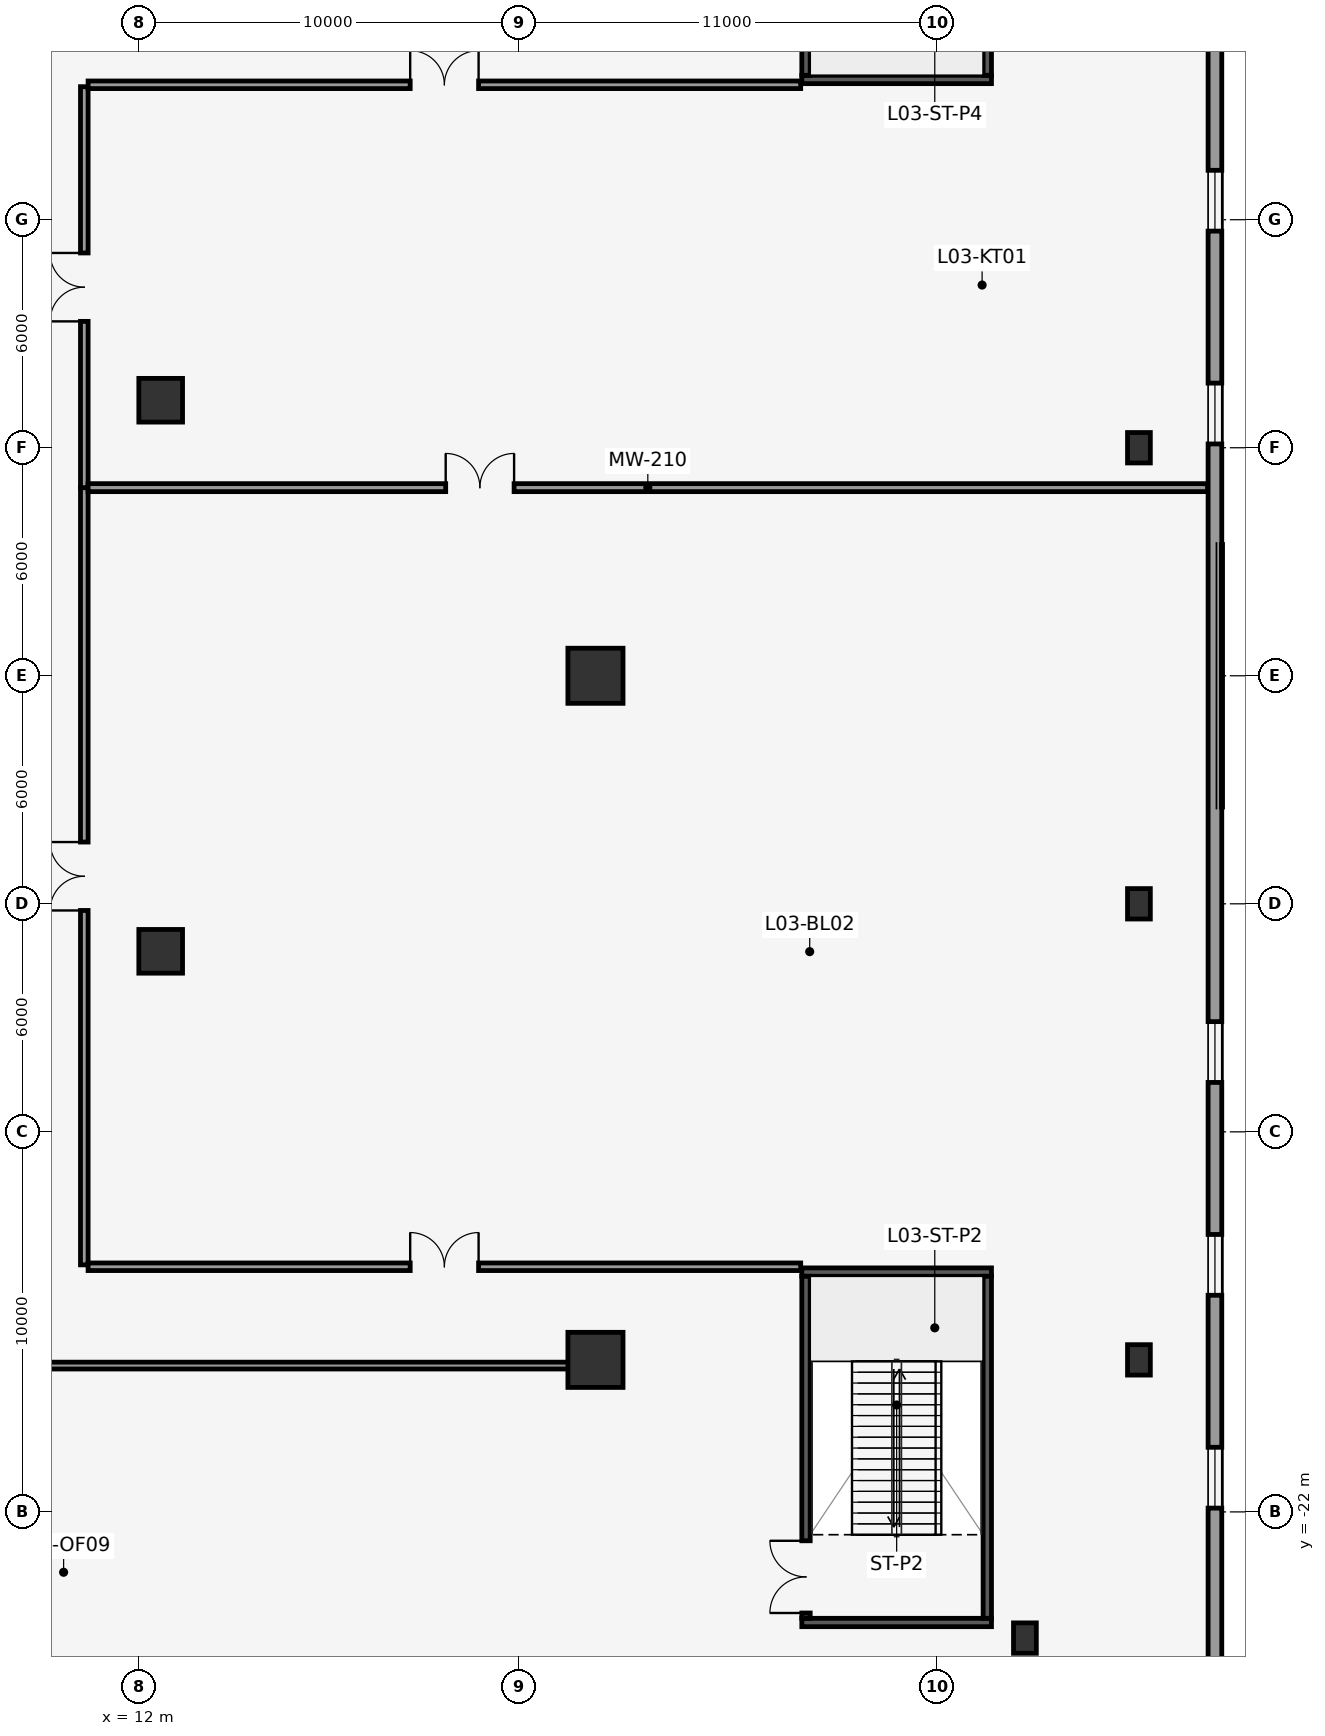
"""IFC4 building model, lengths in metres.
Left out: names, types, materials, properties, quantities, classifications, styles, units other than length and angle.
Written with IfcOpenShell. Run it as: python <this file> out.ifc"""

import sys

from ifc_helpers import new_model, si_unit, direction, frame, frame_2d, origin, origin_2d, place, context, subcontext, project, spatial, rectangle, hollow_rectangle, extrude, element, fill, save


model = new_model("IFC4")
c1 = context("Model", 3, precision=1e-05, world=origin(), true_north=direction((0.0, 1.0)))
c2 = subcontext(c1, "Body", "Model", "MODEL_VIEW")
j1 = project(units=[si_unit("LENGTHUNIT", "METRE"), si_unit("PLANEANGLEUNIT", "RADIAN")], contexts=[c1])
p1 = place(None, origin())
s1 = spatial("IfcSite", under=j1, at=p1, CompositionType="ELEMENT")
p2 = place(p1, origin())
s2 = spatial("IfcBuilding", under=s1, at=p2, CompositionType="ELEMENT")
p3 = place(p2, frame((0.0, 0.0, 17.5)))
s3 = spatial("IfcBuildingStorey", under=s2, at=p3, CompositionType="ELEMENT", Elevation=17.5)
for number, where, z_axis, x_axis in (
    (1, (12.56, -7.25, 0.0), (0.0, 0.0, 1.0), (1.0, 0.0, 0.0)),
    (2, (12.56, 7.25, 0.0), (0.0, 0.0, 1.0), (1.0, 0.0, 0.0)),
):
    element("IfcColumn", number, at=place(p3, frame(where, z_axis=z_axis, x_axis=x_axis)), inside=s3, PredefinedType="COLUMN", context=c2, shape_type="SweptSolid", body=[
        extrude(rectangle(XDim=1.15, YDim=1.15, at=origin_2d()), origin(), (0.0, 0.0, 1.0), 6.0),
    ])
for number, where, z_axis, x_axis in (
    (3, (24.0, -18.0, 0.0), (0.0, 0.0, 1.0), (1.0, 0.0, 0.0)),
    (4, (24.0, 0.0, 0.0), (0.0, 0.0, 1.0), (1.0, 0.0, 0.0)),
):
    element("IfcColumn", number, at=place(p3, frame(where, z_axis=z_axis, x_axis=x_axis)), inside=s3, PredefinedType="COLUMN", context=c2, shape_type="SweptSolid", body=[
        extrude(rectangle(XDim=1.45, YDim=1.45, at=origin_2d()), origin(), (0.0, 0.0, 1.0), 6.0),
    ])
for number, where, z_axis, x_axis in (
    (5, (38.3, -18.0, 0.0), (0.0, 0.0, 1.0), (1.0, 0.0, 0.0)),
    (6, (38.3, -6.0, 0.0), (0.0, 0.0, 1.0), (1.0, 0.0, 0.0)),
    (7, (38.3, 6.0, 0.0), (0.0, 0.0, 1.0), (1.0, 0.0, 0.0)),
    (8, (35.3, -25.32, 0.0), (0.0, 0.0, 1.0), (1.0, 0.0, 0.0)),
):
    element("IfcColumn", number, at=place(p3, frame(where, z_axis=z_axis, x_axis=x_axis)), inside=s3, PredefinedType="COLUMN", context=c2, shape_type="SweptSolid", body=[
        extrude(hollow_rectangle(XDim=0.6, YDim=0.8, WallThickness=0.05, at=origin_2d()), origin(), (0.0, 0.0, 1.0), 6.0),
    ])
p4 = place(p3, frame((40.3, 29.3, 0.0), z_axis=(0.0, 0.0, 1.0), x_axis=(0.0, -1.0, 0.0)))
e9 = element("IfcWall", 9, at=p4, inside=s3, PredefinedType="STANDARD", context=c2, shape_type="SweptSolid", body=[
    extrude(rectangle(XDim=58.6, YDim=0.36, at=frame_2d((29.3, 0.0))), origin(), (0.0, 0.0, 1.0), 5.7),
])
p5 = place(p4, frame((4.8, 0.0, 0.9)))
e10 = element("IfcOpeningElement", 10, at=p5, cuts=e9, PredefinedType="OPENING", context=c2, shape_type="SweptSolid", body=[
    extrude(rectangle(XDim=1.6, YDim=2.6, at=frame_2d((0.8, 1.3))), frame((0.0, 0.19, 0.0), z_axis=(0.0, -1.0, 0.0), x_axis=(1.0, 0.0, 0.0)), (0.0, 0.0, 1.0), 0.38),
])
p6 = place(p4, frame((10.4, 0.0, 0.9)))
e11 = element("IfcOpeningElement", 11, at=p6, cuts=e9, PredefinedType="OPENING", context=c2, shape_type="SweptSolid", body=[
    extrude(rectangle(XDim=1.6, YDim=2.6, at=frame_2d((0.8, 1.3))), frame((0.0, 0.19, 0.0), z_axis=(0.0, -1.0, 0.0), x_axis=(1.0, 0.0, 0.0)), (0.0, 0.0, 1.0), 0.38),
])
p7 = place(p4, frame((16.0, 0.0, 0.9)))
e12 = element("IfcOpeningElement", 12, at=p7, cuts=e9, PredefinedType="OPENING", context=c2, shape_type="SweptSolid", body=[
    extrude(rectangle(XDim=1.6, YDim=2.6, at=frame_2d((0.8, 1.3))), frame((0.0, 0.19, 0.0), z_axis=(0.0, -1.0, 0.0), x_axis=(1.0, 0.0, 0.0)), (0.0, 0.0, 1.0), 0.38),
])
p8 = place(p4, frame((21.6, 0.0, 0.9)))
e13 = element("IfcOpeningElement", 13, at=p8, cuts=e9, PredefinedType="OPENING", context=c2, shape_type="SweptSolid", body=[
    extrude(rectangle(XDim=1.6, YDim=2.6, at=frame_2d((0.8, 1.3))), frame((0.0, 0.19, 0.0), z_axis=(0.0, -1.0, 0.0), x_axis=(1.0, 0.0, 0.0)), (0.0, 0.0, 1.0), 0.38),
])
p9 = place(p4, frame((38.4, 0.0, 0.9)))
e14 = element("IfcOpeningElement", 14, at=p9, cuts=e9, PredefinedType="OPENING", context=c2, shape_type="SweptSolid", body=[
    extrude(rectangle(XDim=1.6, YDim=2.6, at=frame_2d((0.8, 1.3))), frame((0.0, 0.19, 0.0), z_axis=(0.0, -1.0, 0.0), x_axis=(1.0, 0.0, 0.0)), (0.0, 0.0, 1.0), 0.38),
])
p10 = place(p4, frame((44.0, 0.0, 0.9)))
e15 = element("IfcOpeningElement", 15, at=p10, cuts=e9, PredefinedType="OPENING", context=c2, shape_type="SweptSolid", body=[
    extrude(rectangle(XDim=1.6, YDim=2.6, at=frame_2d((0.8, 1.3))), frame((0.0, 0.19, 0.0), z_axis=(0.0, -1.0, 0.0), x_axis=(1.0, 0.0, 0.0)), (0.0, 0.0, 1.0), 0.38),
])
p11 = place(p4, frame((49.6, 0.0, 0.9)))
e16 = element("IfcOpeningElement", 16, at=p11, cuts=e9, PredefinedType="OPENING", context=c2, shape_type="SweptSolid", body=[
    extrude(rectangle(XDim=1.6, YDim=2.6, at=frame_2d((0.8, 1.3))), frame((0.0, 0.19, 0.0), z_axis=(0.0, -1.0, 0.0), x_axis=(1.0, 0.0, 0.0)), (0.0, 0.0, 1.0), 0.38),
])
for number, where, z_axis, x_axis in (
    (17, (29.43, -24.91, 0.0), (0.0, 0.0, 1.0), (1.0, 0.0, 0.0)),
    (18, (29.43, -15.69, 0.0), (0.0, 0.0, 1.0), (1.0, 0.0, 0.0)),
):
    element("IfcWall", number, at=place(p3, frame(where, z_axis=z_axis, x_axis=x_axis)), inside=s3, PredefinedType="SHEAR", context=c2, shape_type="SweptSolid", body=[
        extrude(rectangle(XDim=4.99, YDim=0.22, at=frame_2d((2.495, 0.0))), origin(), (0.0, 0.0, 1.0), 5.7),
    ])
p12 = place(p3, frame((29.54, -24.8, 0.0), z_axis=(0.0, 0.0, 1.0), x_axis=(0.0, 1.0, 0.0)))
e19 = element("IfcWall", 19, at=p12, inside=s3, PredefinedType="SHEAR", context=c2, shape_type="SweptSolid", body=[
    extrude(rectangle(XDim=9.0, YDim=0.22, at=frame_2d((4.5, 0.0))), origin(), (0.0, 0.0, 1.0), 5.7),
])
p13 = place(p12, frame((0.14, 0.0, 0.0)))
e20 = element("IfcOpeningElement", 20, at=p13, cuts=e19, PredefinedType="OPENING", context=c2, shape_type="SweptSolid", body=[
    extrude(rectangle(XDim=1.9, YDim=2.2, at=frame_2d((0.95, 1.1))), frame((0.0, 0.12, 0.0), z_axis=(0.0, -1.0, 0.0), x_axis=(1.0, 0.0, 0.0)), (0.0, 0.0, 1.0), 0.24),
])
p14 = place(p3, frame((34.31, -24.8, 0.0), z_axis=(0.0, 0.0, 1.0), x_axis=(0.0, 1.0, 0.0)))
e21 = element("IfcWall", 21, at=p14, inside=s3, PredefinedType="SHEAR", context=c2, shape_type="SweptSolid", body=[
    extrude(rectangle(XDim=9.0, YDim=0.22, at=frame_2d((4.5, 0.0))), origin(), (0.0, 0.0, 1.0), 5.7),
])
p15 = place(p3, frame((29.43, 15.69, 0.0), z_axis=(0.0, 0.0, 1.0), x_axis=(1.0, 0.0, 0.0)))
e22 = element("IfcWall", 22, at=p15, inside=s3, PredefinedType="SHEAR", context=c2, shape_type="SweptSolid", body=[
    extrude(rectangle(XDim=4.99, YDim=0.22, at=frame_2d((2.495, 0.0))), origin(), (0.0, 0.0, 1.0), 5.7),
])
p16 = place(p3, frame((29.54, 15.8, 0.0), z_axis=(0.0, 0.0, 1.0), x_axis=(0.0, 1.0, 0.0)))
e23 = element("IfcWall", 23, at=p16, inside=s3, PredefinedType="SHEAR", context=c2, shape_type="SweptSolid", body=[
    extrude(rectangle(XDim=9.0, YDim=0.22, at=frame_2d((4.5, 0.0))), origin(), (0.0, 0.0, 1.0), 5.7),
])
p17 = place(p16, frame((6.96, 0.0, 0.0)))
e24 = element("IfcOpeningElement", 24, at=p17, cuts=e23, PredefinedType="OPENING", context=c2, shape_type="SweptSolid", body=[
    extrude(rectangle(XDim=1.9, YDim=2.2, at=frame_2d((0.95, 1.1))), frame((0.0, 0.12, 0.0), z_axis=(0.0, -1.0, 0.0), x_axis=(1.0, 0.0, 0.0)), (0.0, 0.0, 1.0), 0.24),
])
p18 = place(p3, frame((34.31, 15.8, 0.0), z_axis=(0.0, 0.0, 1.0), x_axis=(0.0, 1.0, 0.0)))
e25 = element("IfcWall", 25, at=p18, inside=s3, PredefinedType="SHEAR", context=c2, shape_type="SweptSolid", body=[
    extrude(rectangle(XDim=9.0, YDim=0.22, at=frame_2d((4.5, 0.0))), origin(), (0.0, 0.0, 1.0), 5.7),
])
p19 = place(p3, frame((10.55, -15.5, 0.0), z_axis=(0.0, 0.0, 1.0), x_axis=(0.0, 1.0, 0.0)))
e26 = element("IfcWall", 26, at=p19, inside=s3, PredefinedType="PARTITIONING", context=c2, shape_type="SweptSolid", body=[
    extrude(rectangle(XDim=20.45, YDim=0.2, at=frame_2d((10.225, 0.0))), origin(), (0.0, 0.0, 1.0), 5.7),
])
p20 = place(p19, frame((9.325, 0.0, 0.0)))
e27 = element("IfcOpeningElement", 27, at=p20, cuts=e26, PredefinedType="OPENING", context=c2, shape_type="SweptSolid", body=[
    extrude(rectangle(XDim=1.8, YDim=2.2, at=frame_2d((0.9, 1.1))), frame((0.0, 0.11, 0.0), z_axis=(0.0, -1.0, 0.0), x_axis=(1.0, 0.0, 0.0)), (0.0, 0.0, 1.0), 0.22),
])
p21 = place(p3, frame((10.55, 4.95, 0.0), z_axis=(0.0, 0.0, 1.0), x_axis=(0.0, 1.0, 0.0)))
e28 = element("IfcWall", 28, at=p21, inside=s3, PredefinedType="PARTITIONING", context=c2, shape_type="SweptSolid", body=[
    extrude(rectangle(XDim=10.55, YDim=0.2, at=frame_2d((5.275, 0.0))), origin(), (0.0, 0.0, 1.0), 5.7),
])
p22 = place(p21, frame((4.375, 0.0, 0.0)))
e29 = element("IfcOpeningElement", 29, at=p22, cuts=e28, PredefinedType="OPENING", context=c2, shape_type="SweptSolid", body=[
    extrude(rectangle(XDim=1.8, YDim=2.2, at=frame_2d((0.9, 1.1))), frame((0.0, 0.11, 0.0), z_axis=(0.0, -1.0, 0.0), x_axis=(1.0, 0.0, 0.0)), (0.0, 0.0, 1.0), 0.22),
])
p23 = place(p3, frame((10.65, 4.95, 0.0), z_axis=(0.0, 0.0, 1.0), x_axis=(1.0, 0.0, 0.0)))
e30 = element("IfcWall", 30, at=p23, inside=s3, PredefinedType="MOVABLE", context=c2, shape_type="SweptSolid", body=[
    extrude(rectangle(XDim=29.455, YDim=0.21, at=frame_2d((14.728, 0.0))), origin(), (0.0, 0.0, 1.0), 4.18),
])
p24 = place(p23, frame((9.409, 0.0, 0.0)))
e31 = element("IfcOpeningElement", 31, at=p24, cuts=e30, PredefinedType="OPENING", context=c2, shape_type="SweptSolid", body=[
    extrude(rectangle(XDim=1.8, YDim=2.2, at=frame_2d((0.9, 1.1))), frame((0.0, 0.115, 0.0), z_axis=(0.0, -1.0, 0.0), x_axis=(1.0, 0.0, 0.0)), (0.0, 0.0, 1.0), 0.23),
])
p25 = place(p3, frame((10.65, 15.55, 0.0), z_axis=(0.0, 0.0, 1.0), x_axis=(1.0, 0.0, 0.0)))
e32 = element("IfcWall", 32, at=p25, inside=s3, PredefinedType="PARTITIONING", context=c2, shape_type="SweptSolid", body=[
    extrude(rectangle(XDim=18.75, YDim=0.2, at=frame_2d((9.375, 0.0))), origin(), (0.0, 0.0, 1.0), 5.7),
])
p26 = place(p25, frame((8.475, 0.0, 0.0)))
e33 = element("IfcOpeningElement", 33, at=p26, cuts=e32, PredefinedType="OPENING", context=c2, shape_type="SweptSolid", body=[
    extrude(rectangle(XDim=1.8, YDim=2.2, at=frame_2d((0.9, 1.1))), frame((0.0, 0.11, 0.0), z_axis=(0.0, -1.0, 0.0), x_axis=(1.0, 0.0, 0.0)), (0.0, 0.0, 1.0), 0.22),
])
p27 = place(p3, frame((10.65, -15.55, 0.0), z_axis=(0.0, 0.0, 1.0), x_axis=(1.0, 0.0, 0.0)))
e34 = element("IfcWall", 34, at=p27, inside=s3, PredefinedType="PARTITIONING", context=c2, shape_type="SweptSolid", body=[
    extrude(rectangle(XDim=18.75, YDim=0.2, at=frame_2d((9.375, 0.0))), origin(), (0.0, 0.0, 1.0), 5.7),
])
p28 = place(p27, frame((8.475, 0.0, 0.0)))
e35 = element("IfcOpeningElement", 35, at=p28, cuts=e34, PredefinedType="OPENING", context=c2, shape_type="SweptSolid", body=[
    extrude(rectangle(XDim=1.8, YDim=2.2, at=frame_2d((0.9, 1.1))), frame((0.0, 0.11, 0.0), z_axis=(0.0, -1.0, 0.0), x_axis=(1.0, 0.0, 0.0)), (0.0, 0.0, 1.0), 0.22),
])
p29 = place(p3, frame((-23.6, -18.15, 0.0), z_axis=(0.0, 0.0, 1.0), x_axis=(1.0, 0.0, 0.0)))
e36 = element("IfcWall", 36, at=p29, inside=s3, PredefinedType="PARTITIONING", context=c2, shape_type="SweptSolid", body=[
    extrude(rectangle(XDim=47.2, YDim=0.18, at=frame_2d((23.6, 0.0))), origin(), (0.0, 0.0, 1.0), 3.88),
])
p30 = place(p29, frame((13.26, 0.0, 0.0)))
e37 = element("IfcOpeningElement", 37, at=p30, cuts=e36, PredefinedType="OPENING", context=c2, shape_type="SweptSolid", body=[
    extrude(rectangle(XDim=1.8, YDim=2.2, at=frame_2d((0.9, 1.1))), frame((0.0, 0.1, 0.0), z_axis=(0.0, -1.0, 0.0), x_axis=(1.0, 0.0, 0.0)), (0.0, 0.0, 1.0), 0.2),
])
p31 = place(p7, origin())
e38 = element("IfcWindow", 38, at=p31, inside=s3, PartitioningType="DOUBLE_PANEL_VERTICAL", PredefinedType="WINDOW", context=c2, shape_type="SweptSolid", body=[
    extrude(rectangle(XDim=1.6, YDim=2.6, at=frame_2d((0.8, 1.3))), frame((0.0, 0.03, 0.0), z_axis=(0.0, -1.0, 0.0), x_axis=(1.0, 0.0, 0.0)), (0.0, 0.0, 1.0), 0.06),
])
fill(e12, e38)
p32 = place(p8, origin())
e39 = element("IfcWindow", 39, at=p32, inside=s3, PartitioningType="DOUBLE_PANEL_VERTICAL", PredefinedType="WINDOW", context=c2, shape_type="SweptSolid", body=[
    extrude(rectangle(XDim=1.6, YDim=2.6, at=frame_2d((0.8, 1.3))), frame((0.0, 0.03, 0.0), z_axis=(0.0, -1.0, 0.0), x_axis=(1.0, 0.0, 0.0)), (0.0, 0.0, 1.0), 0.06),
])
fill(e13, e39)
p33 = place(p9, origin())
e40 = element("IfcWindow", 40, at=p33, inside=s3, PartitioningType="DOUBLE_PANEL_VERTICAL", PredefinedType="WINDOW", context=c2, shape_type="SweptSolid", body=[
    extrude(rectangle(XDim=1.6, YDim=2.6, at=frame_2d((0.8, 1.3))), frame((0.0, 0.03, 0.0), z_axis=(0.0, -1.0, 0.0), x_axis=(1.0, 0.0, 0.0)), (0.0, 0.0, 1.0), 0.06),
])
fill(e14, e40)
p34 = place(p10, origin())
e41 = element("IfcWindow", 41, at=p34, inside=s3, PartitioningType="DOUBLE_PANEL_VERTICAL", PredefinedType="WINDOW", context=c2, shape_type="SweptSolid", body=[
    extrude(rectangle(XDim=1.6, YDim=2.6, at=frame_2d((0.8, 1.3))), frame((0.0, 0.03, 0.0), z_axis=(0.0, -1.0, 0.0), x_axis=(1.0, 0.0, 0.0)), (0.0, 0.0, 1.0), 0.06),
])
fill(e15, e41)
p35 = place(p11, origin())
e42 = element("IfcWindow", 42, at=p35, inside=s3, PartitioningType="DOUBLE_PANEL_VERTICAL", PredefinedType="WINDOW", context=c2, shape_type="SweptSolid", body=[
    extrude(rectangle(XDim=1.6, YDim=2.6, at=frame_2d((0.8, 1.3))), frame((0.0, 0.03, 0.0), z_axis=(0.0, -1.0, 0.0), x_axis=(1.0, 0.0, 0.0)), (0.0, 0.0, 1.0), 0.06),
])
fill(e16, e42)
p36 = place(p13, origin())
e43 = element("IfcDoor", 43, at=p36, inside=s3, OperationType="DOUBLE_DOOR_SINGLE_SWING", PredefinedType="DOOR", context=c2, shape_type="SweptSolid", body=[
    extrude(rectangle(XDim=1.9, YDim=2.2, at=frame_2d((0.95, 1.1))), frame((0.0, 0.025, 0.0), z_axis=(0.0, -1.0, 0.0), x_axis=(1.0, 0.0, 0.0)), (0.0, 0.0, 1.0), 0.05),
])
fill(e20, e43)
p37 = place(p20, origin())
e44 = element("IfcDoor", 44, at=p37, inside=s3, OperationType="DOUBLE_DOOR_SINGLE_SWING", PredefinedType="DOOR", context=c2, shape_type="SweptSolid", body=[
    extrude(rectangle(XDim=1.8, YDim=2.2, at=frame_2d((0.9, 1.1))), frame((0.0, 0.025, 0.0), z_axis=(0.0, -1.0, 0.0), x_axis=(1.0, 0.0, 0.0)), (0.0, 0.0, 1.0), 0.05),
])
fill(e27, e44)
p38 = place(p22, origin())
e45 = element("IfcDoor", 45, at=p38, inside=s3, OperationType="DOUBLE_DOOR_SINGLE_SWING", PredefinedType="DOOR", context=c2, shape_type="SweptSolid", body=[
    extrude(rectangle(XDim=1.8, YDim=2.2, at=frame_2d((0.9, 1.1))), frame((0.0, 0.025, 0.0), z_axis=(0.0, -1.0, 0.0), x_axis=(1.0, 0.0, 0.0)), (0.0, 0.0, 1.0), 0.05),
])
fill(e29, e45)
p39 = place(p24, origin())
e46 = element("IfcDoor", 46, at=p39, inside=s3, OperationType="DOUBLE_DOOR_SINGLE_SWING", PredefinedType="DOOR", context=c2, shape_type="SweptSolid", body=[
    extrude(rectangle(XDim=1.8, YDim=2.2, at=frame_2d((0.9, 1.1))), frame((0.0, 0.025, 0.0), z_axis=(0.0, -1.0, 0.0), x_axis=(1.0, 0.0, 0.0)), (0.0, 0.0, 1.0), 0.05),
])
fill(e31, e46)
p40 = place(p26, origin())
e47 = element("IfcDoor", 47, at=p40, inside=s3, OperationType="DOUBLE_DOOR_SINGLE_SWING", PredefinedType="DOOR", context=c2, shape_type="SweptSolid", body=[
    extrude(rectangle(XDim=1.8, YDim=2.2, at=frame_2d((0.9, 1.1))), frame((0.0, 0.025, 0.0), z_axis=(0.0, -1.0, 0.0), x_axis=(1.0, 0.0, 0.0)), (0.0, 0.0, 1.0), 0.05),
])
fill(e33, e47)
p41 = place(p28, origin())
e48 = element("IfcDoor", 48, at=p41, inside=s3, OperationType="DOUBLE_DOOR_SINGLE_SWING", PredefinedType="DOOR", context=c2, shape_type="SweptSolid", body=[
    extrude(rectangle(XDim=1.8, YDim=2.2, at=frame_2d((0.9, 1.1))), frame((0.0, 0.025, 0.0), z_axis=(0.0, -1.0, 0.0), x_axis=(1.0, 0.0, 0.0)), (0.0, 0.0, 1.0), 0.05),
])
fill(e35, e48)
save(model, sys.argv[1])
